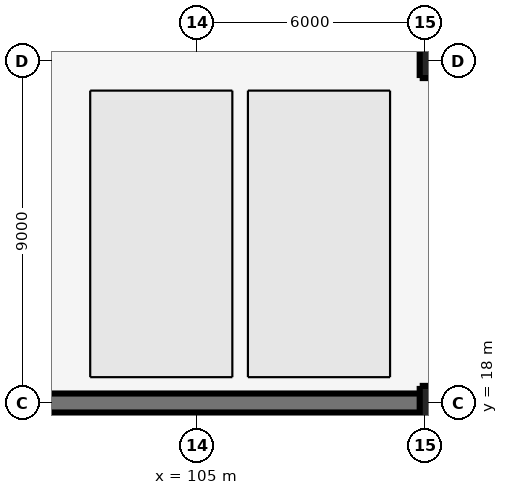
"""IFC4 building model, lengths in metres.
Left out: names, types, materials, properties, quantities, classifications, styles, units other than length and angle.
Written with IfcOpenShell. Run it as: python <this file> out.ifc"""

import sys

from ifc_helpers import new_model, si_unit, direction, frame, frame_2d, origin, origin_2d, place, context, subcontext, project, spatial, rectangle, i_section, extrude, element, save


model = new_model("IFC4")
c1 = context("Model", 3, precision=1e-05, world=origin(), true_north=direction((0.0, 1.0)))
c2 = subcontext(c1, "Body", "Model", "MODEL_VIEW")
j1 = project(units=[si_unit("LENGTHUNIT", "METRE"), si_unit("PLANEANGLEUNIT", "RADIAN")], contexts=[c1])
p1 = place(None, origin())
s1 = spatial("IfcSite", under=j1, at=p1, CompositionType="ELEMENT")
p2 = place(p1, origin())
s2 = spatial("IfcBuilding", under=s1, at=p2, CompositionType="ELEMENT")
p3 = place(p2, frame((0.0, 0.0, -4.8)))
s3 = spatial("IfcBuildingStorey", under=s2, at=p3, CompositionType="ELEMENT", Elevation=-4.8)
for number, where, z_axis, x_axis in (
    (1, (111.0, 18.0, 0.0), (0.0, 0.0, 1.0), (1.0, 0.0, 0.0)),
    (2, (111.0, 27.0, 0.0), (0.0, 0.0, 1.0), (1.0, 0.0, 0.0)),
):
    element("IfcColumn", number, at=place(p3, frame(where, z_axis=z_axis, x_axis=x_axis)), inside=s3, PredefinedType="COLUMN", context=c2, shape_type="SweptSolid", body=[
        extrude(i_section(OverallWidth=0.3, OverallDepth=0.9, WebThickness=0.019, FlangeThickness=0.035, FilletRadius=0.03, at=origin_2d()), origin(), (0.0, 0.0, 1.0), 4.8),
    ])
p4 = place(p3, frame((162.0, 18.0, 0.0), z_axis=(0.0, 0.0, 1.0), x_axis=(-1.0, 0.0, 0.0)))
e3 = element("IfcWall", 3, at=p4, inside=s3, PredefinedType="SOLIDWALL", context=c2, shape_type="SweptSolid", body=[
    extrude(rectangle(XDim=63.0, YDim=0.5, at=frame_2d((31.5, 0.0))), origin(), (0.0, 0.0, 1.0), 4.5),
])
save(model, sys.argv[1])
